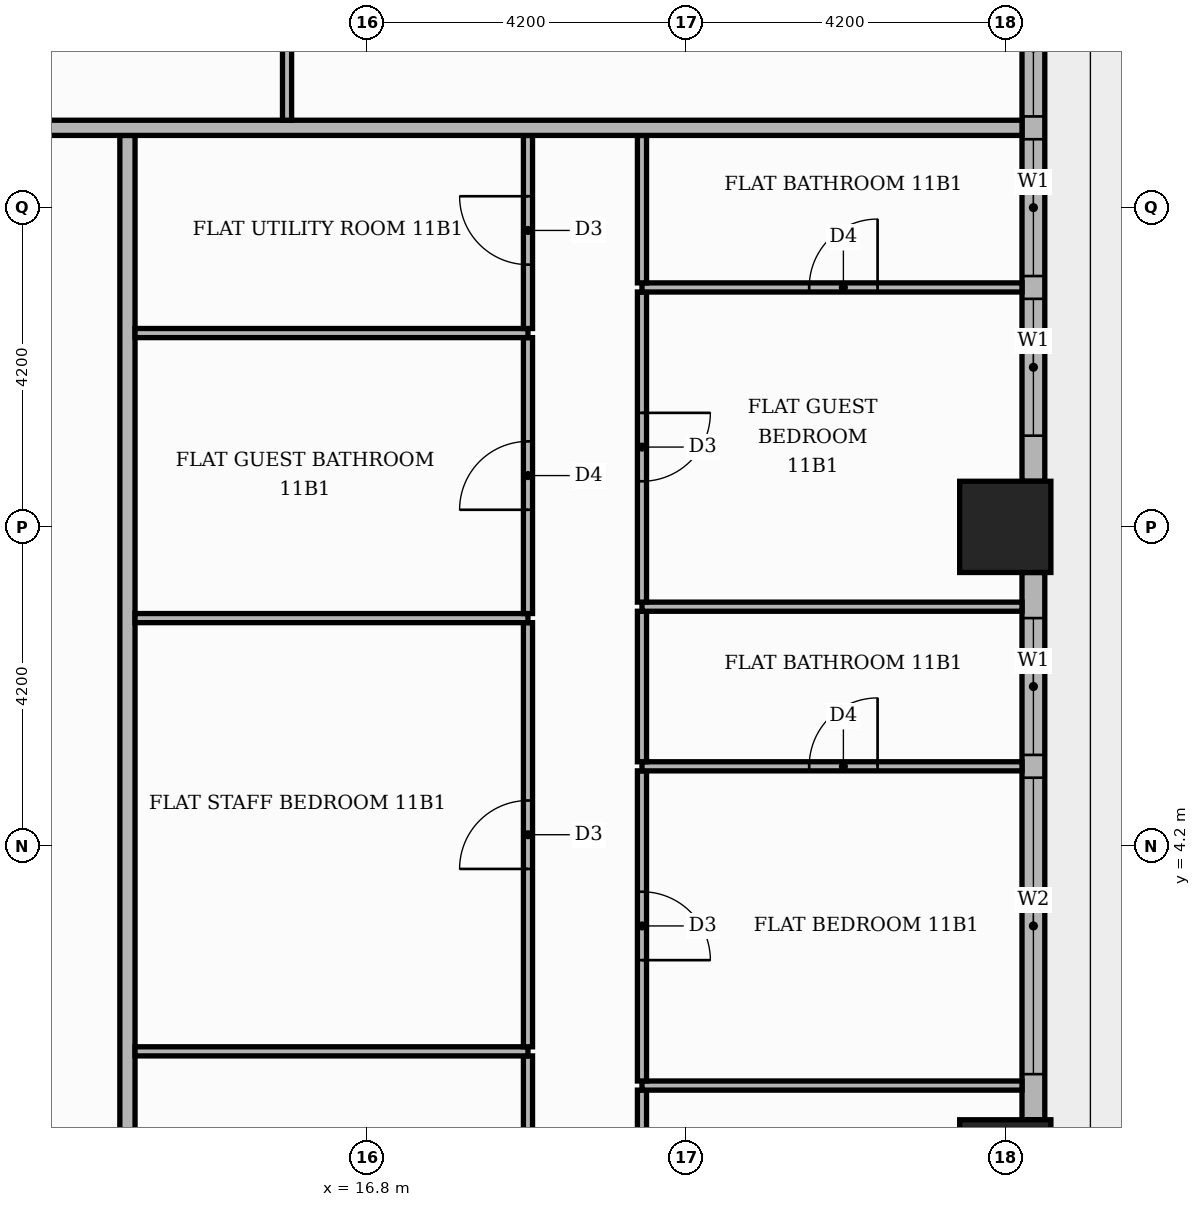
"""IFC4 building model, lengths in metres.
Left out: names, types, materials, properties, quantities, classifications, styles, units other than length and angle.
Written with IfcOpenShell. Run it as: python <this file> out.ifc"""

import sys

from ifc_helpers import new_model, si_unit, direction, frame, frame_2d, origin, origin_2d, place, context, subcontext, project, spatial, rectangle, extrude, element, fill, save


model = new_model("IFC4")
c1 = context("Model", 3, precision=1e-05, world=origin(), true_north=direction((0.0, 1.0)))
c2 = subcontext(c1, "Body", "Model", "MODEL_VIEW")
j1 = project(units=[si_unit("LENGTHUNIT", "METRE"), si_unit("PLANEANGLEUNIT", "RADIAN")], contexts=[c1])
p1 = place(None, origin())
s1 = spatial("IfcSite", under=j1, at=p1, CompositionType="ELEMENT")
p2 = place(p1, origin())
s2 = spatial("IfcBuilding", under=s1, at=p2, CompositionType="ELEMENT")
p3 = place(p2, frame((0.0, 0.0, 50.4)))
s3 = spatial("IfcBuildingStorey", under=s2, at=p3, CompositionType="ELEMENT", Elevation=50.4)
for number, where, z_axis, x_axis in (
    (1, (25.2, 0.0, 0.0), (0.0, 0.0, 1.0), (1.0, 0.0, 0.0)),
    (2, (25.2, 8.4, 0.0), (0.0, 0.0, 1.0), (1.0, 0.0, 0.0)),
):
    element("IfcColumn", number, at=place(p3, frame(where, z_axis=z_axis, x_axis=x_axis)), inside=s3, PredefinedType="COLUMN", context=c2, shape_type="SweptSolid", body=[
        extrude(rectangle(XDim=1.2, YDim=1.2, at=origin_2d()), origin(), (0.0, 0.0, 1.0), 3.9),
    ])
p4 = place(p3, frame((25.57, 0.6, 0.0), z_axis=(0.0, 0.0, 1.0), x_axis=(0.0, 1.0, 0.0)))
e3 = element("IfcWall", 3, at=p4, inside=s3, PredefinedType="STANDARD", context=c2, shape_type="SweptSolid", body=[
    extrude(rectangle(XDim=7.2, YDim=0.3, at=frame_2d((3.6, 0.0))), origin(), (0.0, 0.0, 1.0), 3.48),
])
p5 = place(p4, frame((0.6, 0.0, 0.9)))
e4 = element("IfcOpeningElement", 4, at=p5, cuts=e3, PredefinedType="OPENING", context=c2, shape_type="SweptSolid", body=[
    extrude(rectangle(XDim=3.9, YDim=2.1, at=frame_2d((1.95, 1.05))), frame((0.0, 0.16, 0.0), z_axis=(0.0, -1.0, 0.0), x_axis=(1.0, 0.0, 0.0)), (0.0, 0.0, 1.0), 0.32),
])
p6 = place(p4, frame((4.8, 0.0, 0.9)))
e5 = element("IfcOpeningElement", 5, at=p6, cuts=e3, PredefinedType="OPENING", context=c2, shape_type="SweptSolid", body=[
    extrude(rectangle(XDim=1.8, YDim=2.1, at=frame_2d((0.9, 1.05))), frame((0.0, 0.16, 0.0), z_axis=(0.0, -1.0, 0.0), x_axis=(1.0, 0.0, 0.0)), (0.0, 0.0, 1.0), 0.32),
])
p7 = place(p3, frame((25.57, 9.0, 0.0), z_axis=(0.0, 0.0, 1.0), x_axis=(0.0, 1.0, 0.0)))
e6 = element("IfcWall", 6, at=p7, inside=s3, PredefinedType="STANDARD", context=c2, shape_type="SweptSolid", body=[
    extrude(rectangle(XDim=7.2, YDim=0.3, at=frame_2d((3.6, 0.0))), origin(), (0.0, 0.0, 1.0), 3.48),
])
p8 = place(p7, frame((0.6, 0.0, 0.9)))
e7 = element("IfcOpeningElement", 7, at=p8, cuts=e6, PredefinedType="OPENING", context=c2, shape_type="SweptSolid", body=[
    extrude(rectangle(XDim=1.8, YDim=2.1, at=frame_2d((0.9, 1.05))), frame((0.0, 0.16, 0.0), z_axis=(0.0, -1.0, 0.0), x_axis=(1.0, 0.0, 0.0)), (0.0, 0.0, 1.0), 0.32),
])
p9 = place(p7, frame((2.7, 0.0, 0.9)))
e8 = element("IfcOpeningElement", 8, at=p9, cuts=e6, PredefinedType="OPENING", context=c2, shape_type="SweptSolid", body=[
    extrude(rectangle(XDim=1.8, YDim=2.1, at=frame_2d((0.9, 1.05))), frame((0.0, 0.16, 0.0), z_axis=(0.0, -1.0, 0.0), x_axis=(1.0, 0.0, 0.0)), (0.0, 0.0, 1.0), 0.32),
])
p10 = place(p7, frame((4.8, 0.0, 0.9)))
e9 = element("IfcOpeningElement", 9, at=p10, cuts=e6, PredefinedType="OPENING", context=c2, shape_type="SweptSolid", body=[
    extrude(rectangle(XDim=1.8, YDim=2.1, at=frame_2d((0.9, 1.05))), frame((0.0, 0.16, 0.0), z_axis=(0.0, -1.0, 0.0), x_axis=(1.0, 0.0, 0.0)), (0.0, 0.0, 1.0), 0.32),
])
p11 = place(p3, frame((13.65, -13.55, 0.0), z_axis=(0.0, 0.0, 1.0), x_axis=(0.0, 1.0, 0.0)))
e10 = element("IfcWall", 10, at=p11, inside=s3, PredefinedType="PARTITIONING", context=c2, shape_type="SweptSolid", body=[
    extrude(rectangle(XDim=27.1, YDim=0.2, at=frame_2d((13.55, 0.0))), origin(), (0.0, 0.0, 1.0), 3.48),
])
p12 = place(p11, frame((1.45, 0.0, 0.0)))
e11 = element("IfcOpeningElement", 11, at=p12, cuts=e10, PredefinedType="OPENING", context=c2, shape_type="SweptSolid", body=[
    extrude(rectangle(XDim=1.1, YDim=2.4, at=frame_2d((0.55, 1.2))), frame((0.0, 0.11, 0.0), z_axis=(0.0, -1.0, 0.0), x_axis=(1.0, 0.0, 0.0)), (0.0, 0.0, 1.0), 0.22),
])
p13 = place(p3, frame((18.92, -3.39, 0.0), z_axis=(0.0, 0.0, 1.0), x_axis=(0.0, 1.0, 0.0)))
e12 = element("IfcWall", 12, at=p13, inside=s3, PredefinedType="PARTITIONING", context=c2, shape_type="SweptSolid", body=[
    extrude(rectangle(XDim=4.83, YDim=0.12, at=frame_2d((2.415, 0.0))), origin(), (0.0, 0.0, 1.0), 3.48),
])
p14 = place(p13, frame((1.965, 0.0, 0.0)))
e13 = element("IfcOpeningElement", 13, at=p14, cuts=e12, PredefinedType="OPENING", context=c2, shape_type="SweptSolid", body=[
    extrude(rectangle(XDim=0.9, YDim=2.1, at=frame_2d((0.45, 1.05))), frame((0.0, 0.07, 0.0), z_axis=(0.0, -1.0, 0.0), x_axis=(1.0, 0.0, 0.0)), (0.0, 0.0, 1.0), 0.14),
])
p15 = place(p3, frame((20.42, -0.99, 0.0), z_axis=(0.0, 0.0, 1.0), x_axis=(0.0, 1.0, 0.0)))
e14 = element("IfcWall", 14, at=p15, inside=s3, PredefinedType="PARTITIONING", context=c2, shape_type="SweptSolid", body=[
    extrude(rectangle(XDim=1.98, YDim=0.12, at=frame_2d((0.99, 0.0))), origin(), (0.0, 0.0, 1.0), 3.48),
])
p16 = place(p3, frame((20.42, 1.05, 0.0), z_axis=(0.0, 0.0, 1.0), x_axis=(1.0, 0.0, 0.0)))
e15 = element("IfcWall", 15, at=p16, inside=s3, PredefinedType="PARTITIONING", context=c2, shape_type="SweptSolid", body=[
    extrude(rectangle(XDim=5.0, YDim=0.12, at=frame_2d((2.5, 0.0))), origin(), (0.0, 0.0, 1.0), 3.48),
])
p17 = place(p3, frame((20.42, 1.11, 0.0), z_axis=(0.0, 0.0, 1.0), x_axis=(0.0, 1.0, 0.0)))
e16 = element("IfcWall", 16, at=p17, inside=s3, PredefinedType="PARTITIONING", context=c2, shape_type="SweptSolid", body=[
    extrude(rectangle(XDim=4.08, YDim=0.12, at=frame_2d((2.04, 0.0))), origin(), (0.0, 0.0, 1.0), 3.48),
])
p18 = place(p17, frame((1.59, 0.0, 0.0)))
e17 = element("IfcOpeningElement", 17, at=p18, cuts=e16, PredefinedType="OPENING", context=c2, shape_type="SweptSolid", body=[
    extrude(rectangle(XDim=0.9, YDim=2.1, at=frame_2d((0.45, 1.05))), frame((0.0, 0.07, 0.0), z_axis=(0.0, -1.0, 0.0), x_axis=(1.0, 0.0, 0.0)), (0.0, 0.0, 1.0), 0.14),
])
p19 = place(p3, frame((13.75, 1.5, 0.0), z_axis=(0.0, 0.0, 1.0), x_axis=(1.0, 0.0, 0.0)))
e18 = element("IfcWall", 18, at=p19, inside=s3, PredefinedType="PARTITIONING", context=c2, shape_type="SweptSolid", body=[
    extrude(rectangle(XDim=5.17, YDim=0.12, at=frame_2d((2.585, 0.0))), origin(), (0.0, 0.0, 1.0), 3.48),
])
p20 = place(p3, frame((18.92, 1.56, 0.0), z_axis=(0.0, 0.0, 1.0), x_axis=(0.0, 1.0, 0.0)))
e19 = element("IfcWall", 19, at=p20, inside=s3, PredefinedType="PARTITIONING", context=c2, shape_type="SweptSolid", body=[
    extrude(rectangle(XDim=5.58, YDim=0.12, at=frame_2d((2.79, 0.0))), origin(), (0.0, 0.0, 1.0), 3.48),
])
p21 = place(p20, frame((2.34, 0.0, 0.0)))
e20 = element("IfcOpeningElement", 20, at=p21, cuts=e19, PredefinedType="OPENING", context=c2, shape_type="SweptSolid", body=[
    extrude(rectangle(XDim=0.9, YDim=2.1, at=frame_2d((0.45, 1.05))), frame((0.0, 0.07, 0.0), z_axis=(0.0, -1.0, 0.0), x_axis=(1.0, 0.0, 0.0)), (0.0, 0.0, 1.0), 0.14),
])
p22 = place(p3, frame((20.42, 5.25, 0.0), z_axis=(0.0, 0.0, 1.0), x_axis=(1.0, 0.0, 0.0)))
e21 = element("IfcWall", 21, at=p22, inside=s3, PredefinedType="PARTITIONING", context=c2, shape_type="SweptSolid", body=[
    extrude(rectangle(XDim=5.0, YDim=0.12, at=frame_2d((2.5, 0.0))), origin(), (0.0, 0.0, 1.0), 3.48),
])
p23 = place(p22, frame((2.2, 0.0, 0.0)))
e22 = element("IfcOpeningElement", 22, at=p23, cuts=e21, PredefinedType="OPENING", context=c2, shape_type="SweptSolid", body=[
    extrude(rectangle(XDim=0.9, YDim=2.1, at=frame_2d((0.45, 1.05))), frame((0.0, 0.07, 0.0), z_axis=(0.0, -1.0, 0.0), x_axis=(1.0, 0.0, 0.0)), (0.0, 0.0, 1.0), 0.14),
])
p24 = place(p3, frame((20.42, 5.31, 0.0), z_axis=(0.0, 0.0, 1.0), x_axis=(0.0, 1.0, 0.0)))
e23 = element("IfcWall", 23, at=p24, inside=s3, PredefinedType="PARTITIONING", context=c2, shape_type="SweptSolid", body=[
    extrude(rectangle(XDim=1.98, YDim=0.12, at=frame_2d((0.99, 0.0))), origin(), (0.0, 0.0, 1.0), 3.48),
])
p25 = place(p3, frame((13.75, 7.2, 0.0), z_axis=(0.0, 0.0, 1.0), x_axis=(1.0, 0.0, 0.0)))
e24 = element("IfcWall", 24, at=p25, inside=s3, PredefinedType="PARTITIONING", context=c2, shape_type="SweptSolid", body=[
    extrude(rectangle(XDim=5.17, YDim=0.12, at=frame_2d((2.585, 0.0))), origin(), (0.0, 0.0, 1.0), 3.48),
])
p26 = place(p3, frame((18.92, 7.26, 0.0), z_axis=(0.0, 0.0, 1.0), x_axis=(0.0, 1.0, 0.0)))
e25 = element("IfcWall", 25, at=p26, inside=s3, PredefinedType="PARTITIONING", context=c2, shape_type="SweptSolid", body=[
    extrude(rectangle(XDim=3.63, YDim=0.12, at=frame_2d((1.815, 0.0))), origin(), (0.0, 0.0, 1.0), 3.48),
])
p27 = place(p26, frame((1.365, 0.0, 0.0)))
e26 = element("IfcOpeningElement", 26, at=p27, cuts=e25, PredefinedType="OPENING", context=c2, shape_type="SweptSolid", body=[
    extrude(rectangle(XDim=0.9, YDim=2.1, at=frame_2d((0.45, 1.05))), frame((0.0, 0.07, 0.0), z_axis=(0.0, -1.0, 0.0), x_axis=(1.0, 0.0, 0.0)), (0.0, 0.0, 1.0), 0.14),
])
p28 = place(p3, frame((20.42, 7.35, 0.0), z_axis=(0.0, 0.0, 1.0), x_axis=(1.0, 0.0, 0.0)))
e27 = element("IfcWall", 27, at=p28, inside=s3, PredefinedType="PARTITIONING", context=c2, shape_type="SweptSolid", body=[
    extrude(rectangle(XDim=5.0, YDim=0.12, at=frame_2d((2.5, 0.0))), origin(), (0.0, 0.0, 1.0), 3.48),
])
p29 = place(p3, frame((20.42, 7.41, 0.0), z_axis=(0.0, 0.0, 1.0), x_axis=(0.0, 1.0, 0.0)))
e28 = element("IfcWall", 28, at=p29, inside=s3, PredefinedType="PARTITIONING", context=c2, shape_type="SweptSolid", body=[
    extrude(rectangle(XDim=4.08, YDim=0.12, at=frame_2d((2.04, 0.0))), origin(), (0.0, 0.0, 1.0), 3.48),
])
p30 = place(p29, frame((1.59, 0.0, 0.0)))
e29 = element("IfcOpeningElement", 29, at=p30, cuts=e28, PredefinedType="OPENING", context=c2, shape_type="SweptSolid", body=[
    extrude(rectangle(XDim=0.9, YDim=2.1, at=frame_2d((0.45, 1.05))), frame((0.0, 0.07, 0.0), z_axis=(0.0, -1.0, 0.0), x_axis=(1.0, 0.0, 0.0)), (0.0, 0.0, 1.0), 0.14),
])
p31 = place(p3, frame((13.75, 10.95, 0.0), z_axis=(0.0, 0.0, 1.0), x_axis=(1.0, 0.0, 0.0)))
e30 = element("IfcWall", 30, at=p31, inside=s3, PredefinedType="PARTITIONING", context=c2, shape_type="SweptSolid", body=[
    extrude(rectangle(XDim=5.17, YDim=0.12, at=frame_2d((2.585, 0.0))), origin(), (0.0, 0.0, 1.0), 3.48),
])
p32 = place(p3, frame((18.92, 11.01, 0.0), z_axis=(0.0, 0.0, 1.0), x_axis=(0.0, 1.0, 0.0)))
e31 = element("IfcWall", 31, at=p32, inside=s3, PredefinedType="PARTITIONING", context=c2, shape_type="SweptSolid", body=[
    extrude(rectangle(XDim=2.54, YDim=0.12, at=frame_2d((1.27, 0.0))), origin(), (0.0, 0.0, 1.0), 3.48),
])
p33 = place(p32, frame((0.84, 0.0, 0.0)))
e32 = element("IfcOpeningElement", 32, at=p33, cuts=e31, PredefinedType="OPENING", context=c2, shape_type="SweptSolid", body=[
    extrude(rectangle(XDim=0.9, YDim=2.1, at=frame_2d((0.45, 1.05))), frame((0.0, 0.07, 0.0), z_axis=(0.0, -1.0, 0.0), x_axis=(1.0, 0.0, 0.0)), (0.0, 0.0, 1.0), 0.14),
])
p34 = place(p3, frame((20.42, 11.55, 0.0), z_axis=(0.0, 0.0, 1.0), x_axis=(1.0, 0.0, 0.0)))
e33 = element("IfcWall", 33, at=p34, inside=s3, PredefinedType="PARTITIONING", context=c2, shape_type="SweptSolid", body=[
    extrude(rectangle(XDim=5.0, YDim=0.12, at=frame_2d((2.5, 0.0))), origin(), (0.0, 0.0, 1.0), 3.48),
])
p35 = place(p34, frame((2.2, 0.0, 0.0)))
e34 = element("IfcOpeningElement", 34, at=p35, cuts=e33, PredefinedType="OPENING", context=c2, shape_type="SweptSolid", body=[
    extrude(rectangle(XDim=0.9, YDim=2.1, at=frame_2d((0.45, 1.05))), frame((0.0, 0.07, 0.0), z_axis=(0.0, -1.0, 0.0), x_axis=(1.0, 0.0, 0.0)), (0.0, 0.0, 1.0), 0.14),
])
p36 = place(p3, frame((20.42, 11.61, 0.0), z_axis=(0.0, 0.0, 1.0), x_axis=(0.0, 1.0, 0.0)))
e35 = element("IfcWall", 35, at=p36, inside=s3, PredefinedType="PARTITIONING", context=c2, shape_type="SweptSolid", body=[
    extrude(rectangle(XDim=1.94, YDim=0.12, at=frame_2d((0.97, 0.0))), origin(), (0.0, 0.0, 1.0), 3.48),
])
p37 = place(p3, frame((-13.65, 13.65, 0.0), z_axis=(0.0, 0.0, 1.0), x_axis=(1.0, 0.0, 0.0)))
e36 = element("IfcWall", 36, at=p37, inside=s3, PredefinedType="PARTITIONING", context=c2, shape_type="SweptSolid", body=[
    extrude(rectangle(XDim=39.07, YDim=0.2, at=frame_2d((19.535, 0.0))), origin(), (0.0, 0.0, 1.0), 3.48),
])
p38 = place(p37, frame((24.65, 0.0, 0.0)))
e37 = element("IfcOpeningElement", 37, at=p38, cuts=e36, PredefinedType="OPENING", context=c2, shape_type="SweptSolid", body=[
    extrude(rectangle(XDim=1.1, YDim=2.4, at=frame_2d((0.55, 1.2))), frame((0.0, 0.11, 0.0), z_axis=(0.0, -1.0, 0.0), x_axis=(1.0, 0.0, 0.0)), (0.0, 0.0, 1.0), 0.22),
])
p39 = place(p37, frame((14.15, 0.0, 0.0)))
e38 = element("IfcOpeningElement", 38, at=p39, cuts=e36, PredefinedType="OPENING", context=c2, shape_type="SweptSolid", body=[
    extrude(rectangle(XDim=1.1, YDim=2.4, at=frame_2d((0.55, 1.2))), frame((0.0, 0.11, 0.0), z_axis=(0.0, -1.0, 0.0), x_axis=(1.0, 0.0, 0.0)), (0.0, 0.0, 1.0), 0.22),
])
p40 = place(p3, frame((15.75, 13.75, 0.0), z_axis=(0.0, 0.0, 1.0), x_axis=(0.0, 1.0, 0.0)))
e39 = element("IfcWall", 39, at=p40, inside=s3, PredefinedType="PARTITIONING", context=c2, shape_type="SweptSolid", body=[
    extrude(rectangle(XDim=6.01, YDim=0.12, at=frame_2d((3.005, 0.0))), origin(), (0.0, 0.0, 1.0), 3.48),
])
p41 = place(p40, frame((2.485, 0.0, 0.0)))
e40 = element("IfcOpeningElement", 40, at=p41, cuts=e39, PredefinedType="OPENING", context=c2, shape_type="SweptSolid", body=[
    extrude(rectangle(XDim=1.0, YDim=2.1, at=frame_2d((0.5, 1.05))), frame((0.0, 0.07, 0.0), z_axis=(0.0, -1.0, 0.0), x_axis=(1.0, 0.0, 0.0)), (0.0, 0.0, 1.0), 0.14),
])
p42 = place(p5, origin())
e41 = element("IfcWindow", 41, at=p42, inside=s3, PartitioningType="SINGLE_PANEL", PredefinedType="WINDOW", context=c2, shape_type="SweptSolid", body=[
    extrude(rectangle(XDim=3.9, YDim=2.1, at=frame_2d((1.95, 1.05))), frame((0.0, 0.03, 0.0), z_axis=(0.0, -1.0, 0.0), x_axis=(1.0, 0.0, 0.0)), (0.0, 0.0, 1.0), 0.06),
])
fill(e4, e41)
p43 = place(p6, origin())
e42 = element("IfcWindow", 42, at=p43, inside=s3, PartitioningType="SINGLE_PANEL", PredefinedType="WINDOW", context=c2, shape_type="SweptSolid", body=[
    extrude(rectangle(XDim=1.8, YDim=2.1, at=frame_2d((0.9, 1.05))), frame((0.0, 0.03, 0.0), z_axis=(0.0, -1.0, 0.0), x_axis=(1.0, 0.0, 0.0)), (0.0, 0.0, 1.0), 0.06),
])
fill(e5, e42)
p44 = place(p8, origin())
e43 = element("IfcWindow", 43, at=p44, inside=s3, PartitioningType="SINGLE_PANEL", PredefinedType="WINDOW", context=c2, shape_type="SweptSolid", body=[
    extrude(rectangle(XDim=1.8, YDim=2.1, at=frame_2d((0.9, 1.05))), frame((0.0, 0.03, 0.0), z_axis=(0.0, -1.0, 0.0), x_axis=(1.0, 0.0, 0.0)), (0.0, 0.0, 1.0), 0.06),
])
fill(e7, e43)
p45 = place(p9, origin())
e44 = element("IfcWindow", 44, at=p45, inside=s3, PartitioningType="SINGLE_PANEL", PredefinedType="WINDOW", context=c2, shape_type="SweptSolid", body=[
    extrude(rectangle(XDim=1.8, YDim=2.1, at=frame_2d((0.9, 1.05))), frame((0.0, 0.03, 0.0), z_axis=(0.0, -1.0, 0.0), x_axis=(1.0, 0.0, 0.0)), (0.0, 0.0, 1.0), 0.06),
])
fill(e8, e44)
p46 = place(p10, origin())
e45 = element("IfcWindow", 45, at=p46, inside=s3, PartitioningType="SINGLE_PANEL", PredefinedType="WINDOW", context=c2, shape_type="SweptSolid", body=[
    extrude(rectangle(XDim=1.8, YDim=2.1, at=frame_2d((0.9, 1.05))), frame((0.0, 0.03, 0.0), z_axis=(0.0, -1.0, 0.0), x_axis=(1.0, 0.0, 0.0)), (0.0, 0.0, 1.0), 0.06),
])
fill(e9, e45)
p47 = place(p21, origin())
e46 = element("IfcDoor", 46, at=p47, inside=s3, OperationType="SINGLE_SWING_LEFT", PredefinedType="DOOR", context=c2, shape_type="SweptSolid", body=[
    extrude(rectangle(XDim=0.9, YDim=2.1, at=frame_2d((0.45, 1.05))), frame((0.0, 0.025, 0.0), z_axis=(0.0, -1.0, 0.0), x_axis=(1.0, 0.0, 0.0)), (0.0, 0.0, 1.0), 0.05),
])
fill(e20, e46)
p48 = place(p27, origin())
e47 = element("IfcDoor", 47, at=p48, inside=s3, OperationType="SINGLE_SWING_LEFT", PredefinedType="DOOR", context=c2, shape_type="SweptSolid", body=[
    extrude(rectangle(XDim=0.9, YDim=2.1, at=frame_2d((0.45, 1.05))), frame((0.0, 0.025, 0.0), z_axis=(0.0, -1.0, 0.0), x_axis=(1.0, 0.0, 0.0)), (0.0, 0.0, 1.0), 0.05),
])
fill(e26, e47)
p49 = place(p33, origin())
e48 = element("IfcDoor", 48, at=p49, inside=s3, OperationType="SINGLE_SWING_RIGHT", PredefinedType="DOOR", context=c2, shape_type="SweptSolid", body=[
    extrude(rectangle(XDim=0.9, YDim=2.1, at=frame_2d((0.45, 1.05))), frame((0.0, 0.025, 0.0), z_axis=(0.0, -1.0, 0.0), x_axis=(1.0, 0.0, 0.0)), (0.0, 0.0, 1.0), 0.05),
])
fill(e32, e48)
p50 = place(p18, frame((0.9, 0.0, 0.0), z_axis=(0.0, 0.0, 1.0), x_axis=(-1.0, 0.0, 0.0)))
e49 = element("IfcDoor", 49, at=p50, inside=s3, OperationType="SINGLE_SWING_LEFT", PredefinedType="DOOR", context=c2, shape_type="SweptSolid", body=[
    extrude(rectangle(XDim=0.9, YDim=2.1, at=frame_2d((0.45, 1.05))), frame((0.0, 0.025, 0.0), z_axis=(0.0, -1.0, 0.0), x_axis=(1.0, 0.0, 0.0)), (0.0, 0.0, 1.0), 0.05),
])
fill(e17, e49)
p51 = place(p23, origin())
e50 = element("IfcDoor", 50, at=p51, inside=s3, OperationType="SINGLE_SWING_RIGHT", PredefinedType="DOOR", context=c2, shape_type="SweptSolid", body=[
    extrude(rectangle(XDim=0.9, YDim=2.1, at=frame_2d((0.45, 1.05))), frame((0.0, 0.025, 0.0), z_axis=(0.0, -1.0, 0.0), x_axis=(1.0, 0.0, 0.0)), (0.0, 0.0, 1.0), 0.05),
])
fill(e22, e50)
p52 = place(p30, frame((0.9, 0.0, 0.0), z_axis=(0.0, 0.0, 1.0), x_axis=(-1.0, 0.0, 0.0)))
e51 = element("IfcDoor", 51, at=p52, inside=s3, OperationType="SINGLE_SWING_RIGHT", PredefinedType="DOOR", context=c2, shape_type="SweptSolid", body=[
    extrude(rectangle(XDim=0.9, YDim=2.1, at=frame_2d((0.45, 1.05))), frame((0.0, 0.025, 0.0), z_axis=(0.0, -1.0, 0.0), x_axis=(1.0, 0.0, 0.0)), (0.0, 0.0, 1.0), 0.05),
])
fill(e29, e51)
p53 = place(p35, origin())
e52 = element("IfcDoor", 52, at=p53, inside=s3, OperationType="SINGLE_SWING_RIGHT", PredefinedType="DOOR", context=c2, shape_type="SweptSolid", body=[
    extrude(rectangle(XDim=0.9, YDim=2.1, at=frame_2d((0.45, 1.05))), frame((0.0, 0.025, 0.0), z_axis=(0.0, -1.0, 0.0), x_axis=(1.0, 0.0, 0.0)), (0.0, 0.0, 1.0), 0.05),
])
fill(e34, e52)
save(model, sys.argv[1])
